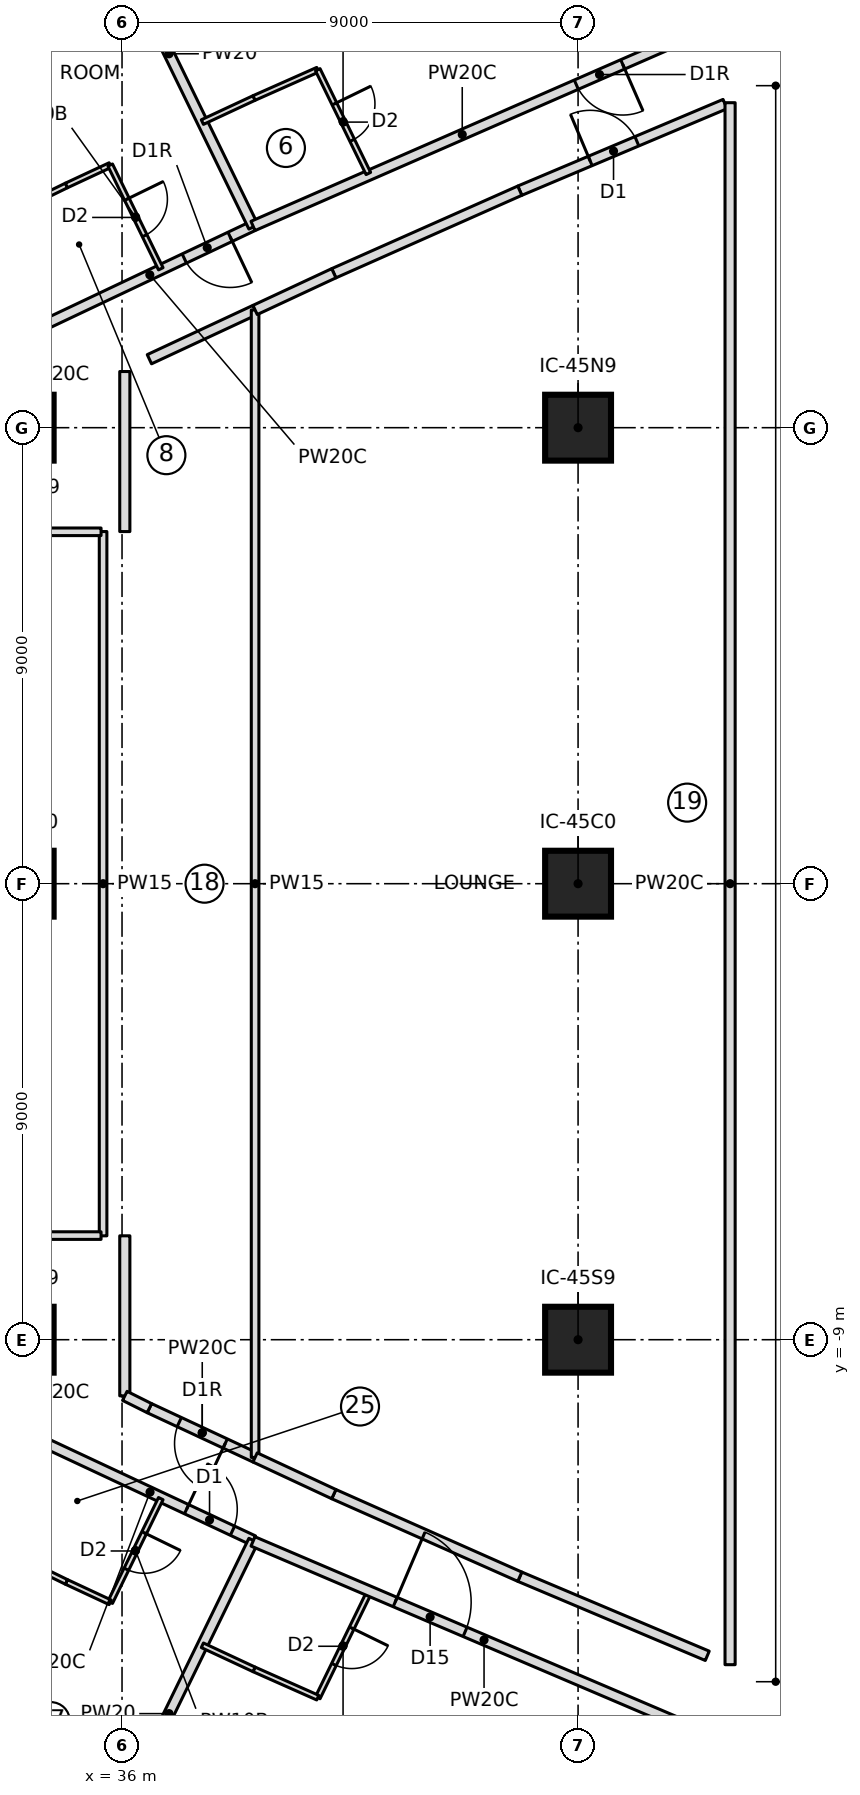
"""IFC4 building model, lengths in metres.
Left out: names, types, materials, properties, quantities, classifications, styles, units other than length and angle.
Written with IfcOpenShell. Run it as: python <this file> out.ifc"""

import sys

from ifc_helpers import new_model, si_unit, direction, frame, frame_2d, origin, origin_2d, place, context, subcontext, project, spatial, rectangle, extrude, element, fill, save


model = new_model("IFC4")
c1 = context("Model", 3, precision=1e-05, world=origin(), true_north=direction((0.0, 1.0)))
c2 = subcontext(c1, "Body", "Model", "MODEL_VIEW")
j1 = project(units=[si_unit("LENGTHUNIT", "METRE"), si_unit("PLANEANGLEUNIT", "RADIAN")], contexts=[c1])
p1 = place(None, origin())
s1 = spatial("IfcSite", under=j1, at=p1, CompositionType="ELEMENT")
p2 = place(p1, origin())
s2 = spatial("IfcBuilding", under=s1, at=p2, CompositionType="ELEMENT")
p3 = place(p2, frame((0.0, 0.0, 39.6)))
s3 = spatial("IfcBuildingStorey", under=s2, at=p3, CompositionType="ELEMENT", Elevation=39.6)
for number, where, z_axis, x_axis in (
    (1, (34.0, -9.0, 0.0), (0.0, 0.0, 1.0), (1.0, 0.0, 0.0)),
    (2, (34.0, 0.0, 0.0), (0.0, 0.0, 1.0), (1.0, 0.0, 0.0)),
    (3, (34.0, 9.0, 0.0), (0.0, 0.0, 1.0), (1.0, 0.0, 0.0)),
    (4, (45.0, -9.0, 0.0), (0.0, 0.0, 1.0), (1.0, 0.0, 0.0)),
    (5, (45.0, 0.0, 0.0), (0.0, 0.0, 1.0), (1.0, 0.0, 0.0)),
    (6, (45.0, 9.0, 0.0), (0.0, 0.0, 1.0), (1.0, 0.0, 0.0)),
):
    element("IfcColumn", number, at=place(p3, frame(where, z_axis=z_axis, x_axis=x_axis)), inside=s3, PredefinedType="COLUMN", context=c2, shape_type="SweptSolid", body=[
        extrude(rectangle(XDim=1.3, YDim=1.3, at=origin_2d()), origin(), (0.0, 0.0, 1.0), 3.55),
    ])
p4 = place(p3, frame((38.585, 12.981, 0.0), z_axis=(0.0, 0.0, 1.0), x_axis=(-0.903706948966, -0.428151550727, 0.0)))
e7 = element("IfcWall", 7, at=p4, inside=s3, PredefinedType="PARTITIONING", context=c2, shape_type="SweptSolid", body=[
    extrude(rectangle(XDim=4.506, YDim=0.2, at=frame_2d((2.253, 0.0))), origin(), (0.0, 0.0, 1.0), 3.25),
])
p5 = place(p4, frame((0.5, 0.0, 0.0)))
e8 = element("IfcOpeningElement", 8, at=p5, cuts=e7, PredefinedType="OPENING", context=c2, shape_type="SweptSolid", body=[
    extrude(rectangle(XDim=1.0, YDim=2.1, at=frame_2d((0.5, 1.05))), frame((0.0, 0.11, 0.0), z_axis=(0.0, -1.0, 0.0), x_axis=(1.0, 0.0, 0.0)), (0.0, 0.0, 1.0), 0.22),
])
p6 = place(p3, frame((33.513, 13.101, 0.0), z_axis=(0.0, 0.0, 1.0), x_axis=(0.898338680123, 0.439303557685, 0.0)))
e9 = element("IfcWall", 9, at=p6, inside=s3, PredefinedType="PARTITIONING", context=c2, shape_type="SweptSolid", body=[
    extrude(rectangle(XDim=1.547, YDim=0.1, at=frame_2d((0.773, 0.0))), origin(), (0.0, 0.0, 1.0), 3.25),
])
p7 = place(p3, frame((34.903, 13.781, 0.0), z_axis=(0.0, 0.0, 1.0), x_axis=(0.906477304063, 0.422254540791, 0.0)))
e10 = element("IfcWall", 10, at=p7, inside=s3, PredefinedType="PARTITIONING", context=c2, shape_type="SweptSolid", body=[
    extrude(rectangle(XDim=0.953, YDim=0.1, at=frame_2d((0.477, 0.0))), origin(), (0.0, 0.0, 1.0), 3.25),
])
p8 = place(p3, frame((35.767, 14.183, 0.0), z_axis=(0.0, 0.0, 1.0), x_axis=(0.438229314017, -0.898863208912, 0.0)))
e11 = element("IfcWall", 11, at=p8, inside=s3, PredefinedType="PARTITIONING", context=c2, shape_type="SweptSolid", body=[
    extrude(rectangle(XDim=2.277, YDim=0.1, at=frame_2d((1.139, 0.0))), origin(), (0.0, 0.0, 1.0), 3.25),
])
p9 = place(p8, frame((0.75, 0.0, 0.0)))
e12 = element("IfcOpeningElement", 12, at=p9, cuts=e11, PredefinedType="OPENING", context=c2, shape_type="SweptSolid", body=[
    extrude(rectangle(XDim=0.8, YDim=2.1, at=frame_2d((0.4, 1.05))), frame((0.0, 0.06, 0.0), z_axis=(0.0, -1.0, 0.0), x_axis=(1.0, 0.0, 0.0)), (0.0, 0.0, 1.0), 0.12),
])
p10 = place(p3, frame((38.594, 12.963, 0.0), z_axis=(0.0, 0.0, 1.0), x_axis=(-0.438197705697, 0.898878618459, 0.0)))
e13 = element("IfcWall", 13, at=p10, inside=s3, PredefinedType="PARTITIONING", context=c2, shape_type="SweptSolid", body=[
    extrude(rectangle(XDim=7.601, YDim=0.2, at=frame_2d((3.801, 0.0))), origin(), (0.0, 0.0, 1.0), 3.25),
])
p11 = place(p3, frame((46.844, 16.591, 0.0), z_axis=(0.0, 0.0, 1.0), x_axis=(-0.916303988169, -0.400483459415, 0.0)))
e14 = element("IfcWall", 14, at=p11, inside=s3, PredefinedType="PARTITIONING", context=c2, shape_type="SweptSolid", body=[
    extrude(rectangle(XDim=9.013, YDim=0.2, at=frame_2d((4.507, 0.0))), origin(), (0.0, 0.0, 1.0), 3.25),
])
p12 = place(p11, frame((1.05, 0.0, 0.0)))
e15 = element("IfcOpeningElement", 15, at=p12, cuts=e14, PredefinedType="OPENING", context=c2, shape_type="SweptSolid", body=[
    extrude(rectangle(XDim=1.0, YDim=2.1, at=frame_2d((0.5, 1.05))), frame((0.0, 0.11, 0.0), z_axis=(0.0, -1.0, 0.0), x_axis=(1.0, 0.0, 0.0)), (0.0, 0.0, 1.0), 0.22),
])
p13 = place(p3, frame((37.586, 15.031, 0.0), z_axis=(0.0, 0.0, 1.0), x_axis=(0.90632717857, 0.422576673972, 0.0)))
e16 = element("IfcWall", 16, at=p13, inside=s3, PredefinedType="PARTITIONING", context=c2, shape_type="SweptSolid", body=[
    extrude(rectangle(XDim=1.125, YDim=0.1, at=frame_2d((0.563, 0.0))), origin(), (0.0, 0.0, 1.0), 3.25),
])
p14 = place(p3, frame((38.606, 15.507, 0.0), z_axis=(0.0, 0.0, 1.0), x_axis=(0.913972512123, 0.405776104625, 0.0)))
e17 = element("IfcWall", 17, at=p14, inside=s3, PredefinedType="PARTITIONING", context=c2, shape_type="SweptSolid", body=[
    extrude(rectangle(XDim=1.375, YDim=0.1, at=frame_2d((0.688, 0.0))), origin(), (0.0, 0.0, 1.0), 3.25),
])
p15 = place(p3, frame((39.863, 16.065, 0.0), z_axis=(0.0, 0.0, 1.0), x_axis=(0.438233629628, -0.898861104878, 0.0)))
e18 = element("IfcWall", 18, at=p15, inside=s3, PredefinedType="PARTITIONING", context=c2, shape_type="SweptSolid", body=[
    extrude(rectangle(XDim=2.279, YDim=0.1, at=frame_2d((1.139, 0.0))), origin(), (0.0, 0.0, 1.0), 3.25),
])
p16 = place(p15, frame((0.75, 0.0, 0.0)))
e19 = element("IfcOpeningElement", 19, at=p16, cuts=e18, PredefinedType="OPENING", context=c2, shape_type="SweptSolid", body=[
    extrude(rectangle(XDim=0.8, YDim=2.1, at=frame_2d((0.4, 1.05))), frame((0.0, 0.06, 0.0), z_axis=(0.0, -1.0, 0.0), x_axis=(1.0, 0.0, 0.0)), (0.0, 0.0, 1.0), 0.12),
])
p17 = place(p3, frame((34.512, -11.052, 0.0), z_axis=(0.0, 0.0, 1.0), x_axis=(0.905585758423, -0.424163216394, 0.0)))
e20 = element("IfcWall", 20, at=p17, inside=s3, PredefinedType="PARTITIONING", context=c2, shape_type="SweptSolid", body=[
    extrude(rectangle(XDim=4.507, YDim=0.2, at=frame_2d((2.253, 0.0))), origin(), (0.0, 0.0, 1.0), 3.25),
])
p18 = place(p17, frame((3.05, 0.0, 0.0)))
e21 = element("IfcOpeningElement", 21, at=p18, cuts=e20, PredefinedType="OPENING", context=c2, shape_type="SweptSolid", body=[
    extrude(rectangle(XDim=1.0, YDim=2.1, at=frame_2d((0.5, 1.05))), frame((0.0, 0.11, 0.0), z_axis=(0.0, -1.0, 0.0), x_axis=(1.0, 0.0, 0.0)), (0.0, 0.0, 1.0), 0.22),
])
p19 = place(p3, frame((36.765, -12.136, 0.0), z_axis=(0.0, 0.0, 1.0), x_axis=(-0.438229314017, -0.898863208912, 0.0)))
e22 = element("IfcWall", 22, at=p19, inside=s3, PredefinedType="PARTITIONING", context=c2, shape_type="SweptSolid", body=[
    extrude(rectangle(XDim=2.277, YDim=0.1, at=frame_2d((1.139, 0.0))), origin(), (0.0, 0.0, 1.0), 3.25),
])
p20 = place(p19, frame((0.75, 0.0, 0.0)))
e23 = element("IfcOpeningElement", 23, at=p20, cuts=e22, PredefinedType="OPENING", context=c2, shape_type="SweptSolid", body=[
    extrude(rectangle(XDim=0.8, YDim=2.1, at=frame_2d((0.4, 1.05))), frame((0.0, 0.06, 0.0), z_axis=(0.0, -1.0, 0.0), x_axis=(1.0, 0.0, 0.0)), (0.0, 0.0, 1.0), 0.12),
])
p21 = place(p3, frame((35.767, -14.183, 0.0), z_axis=(0.0, 0.0, 1.0), x_axis=(-0.906477304063, 0.422254540791, 0.0)))
e24 = element("IfcWall", 24, at=p21, inside=s3, PredefinedType="PARTITIONING", context=c2, shape_type="SweptSolid", body=[
    extrude(rectangle(XDim=0.953, YDim=0.1, at=frame_2d((0.477, 0.0))), origin(), (0.0, 0.0, 1.0), 3.25),
])
p22 = place(p3, frame((34.903, -13.781, 0.0), z_axis=(0.0, 0.0, 1.0), x_axis=(-0.898338680123, 0.439303557685, 0.0)))
e25 = element("IfcWall", 25, at=p22, inside=s3, PredefinedType="PARTITIONING", context=c2, shape_type="SweptSolid", body=[
    extrude(rectangle(XDim=1.547, YDim=0.1, at=frame_2d((0.773, 0.0))), origin(), (0.0, 0.0, 1.0), 3.25),
])
p23 = place(p3, frame((35.263, -19.796, 0.0), z_axis=(0.0, 0.0, 1.0), x_axis=(0.438197705697, 0.898878618459, 0.0)))
e26 = element("IfcWall", 26, at=p23, inside=s3, PredefinedType="PARTITIONING", context=c2, shape_type="SweptSolid", body=[
    extrude(rectangle(XDim=7.601, YDim=0.2, at=frame_2d((3.801, 0.0))), origin(), (0.0, 0.0, 1.0), 3.25),
])
p24 = place(p3, frame((40.861, -14.017, 0.0), z_axis=(0.0, 0.0, 1.0), x_axis=(-0.438233629628, -0.898861104878, 0.0)))
e27 = element("IfcWall", 27, at=p24, inside=s3, PredefinedType="PARTITIONING", context=c2, shape_type="SweptSolid", body=[
    extrude(rectangle(XDim=2.279, YDim=0.1, at=frame_2d((1.139, 0.0))), origin(), (0.0, 0.0, 1.0), 3.25),
])
p25 = place(p24, frame((0.75, 0.0, 0.0)))
e28 = element("IfcOpeningElement", 28, at=p25, cuts=e27, PredefinedType="OPENING", context=c2, shape_type="SweptSolid", body=[
    extrude(rectangle(XDim=0.8, YDim=2.1, at=frame_2d((0.4, 1.05))), frame((0.0, 0.06, 0.0), z_axis=(0.0, -1.0, 0.0), x_axis=(1.0, 0.0, 0.0)), (0.0, 0.0, 1.0), 0.12),
])
p26 = place(p3, frame((39.863, -16.065, 0.0), z_axis=(0.0, 0.0, 1.0), x_axis=(-0.913972512123, 0.405776104625, 0.0)))
e29 = element("IfcWall", 29, at=p26, inside=s3, PredefinedType="PARTITIONING", context=c2, shape_type="SweptSolid", body=[
    extrude(rectangle(XDim=1.375, YDim=0.1, at=frame_2d((0.688, 0.0))), origin(), (0.0, 0.0, 1.0), 3.25),
])
p27 = place(p3, frame((38.606, -15.507, 0.0), z_axis=(0.0, 0.0, 1.0), x_axis=(-0.90632717857, 0.422576673972, 0.0)))
e30 = element("IfcWall", 30, at=p27, inside=s3, PredefinedType="PARTITIONING", context=c2, shape_type="SweptSolid", body=[
    extrude(rectangle(XDim=1.125, YDim=0.1, at=frame_2d((0.563, 0.0))), origin(), (0.0, 0.0, 1.0), 3.25),
])
p28 = place(p3, frame((35.626, -6.95, 0.0), z_axis=(0.0, 0.0, 1.0), x_axis=(0.0, 1.0, 0.0)))
e31 = element("IfcWall", 31, at=p28, inside=s3, PredefinedType="PARTITIONING", context=c2, shape_type="SweptSolid", body=[
    extrude(rectangle(XDim=13.9, YDim=0.15, at=frame_2d((6.95, 0.0))), origin(), (0.0, 0.0, 1.0), 3.25),
])
p29 = place(p3, frame((38.626, -11.323, 0.0), z_axis=(0.0, 0.0, 1.0), x_axis=(-0.906372737018, 0.422478948103, 0.0)))
e32 = element("IfcWall", 32, at=p29, inside=s3, PredefinedType="PARTITIONING", context=c2, shape_type="SweptSolid", body=[
    extrude(rectangle(XDim=2.302, YDim=0.2, at=frame_2d((1.151, 0.0))), origin(), (0.0, 0.0, 1.0), 3.25),
])
p30 = place(p29, frame((0.651, 0.0, 0.0)))
e33 = element("IfcOpeningElement", 33, at=p30, cuts=e32, PredefinedType="OPENING", context=c2, shape_type="SweptSolid", body=[
    extrude(rectangle(XDim=1.0, YDim=2.1, at=frame_2d((0.5, 1.05))), frame((0.0, 0.11, 0.0), z_axis=(0.0, -1.0, 0.0), x_axis=(1.0, 0.0, 0.0)), (0.0, 0.0, 1.0), 0.22),
])
p31 = place(p3, frame((36.54, 10.351, 0.0), z_axis=(0.0, 0.0, 1.0), x_axis=(0.906372737018, 0.422478948103, 0.0)))
e34 = element("IfcWall", 34, at=p31, inside=s3, PredefinedType="PARTITIONING", context=c2, shape_type="SweptSolid", body=[
    extrude(rectangle(XDim=2.302, YDim=0.2, at=frame_2d((1.151, 0.0))), origin(), (0.0, 0.0, 1.0), 3.25),
])
p32 = place(p3, frame((38.626, -11.323, 0.0), z_axis=(0.0, 0.0, 1.0), x_axis=(0.0, 1.0, 0.0)))
e35 = element("IfcWall", 35, at=p32, inside=s3, PredefinedType="PARTITIONING", context=c2, shape_type="SweptSolid", body=[
    extrude(rectangle(XDim=22.647, YDim=0.15, at=frame_2d((11.323, 0.0))), origin(), (0.0, 0.0, 1.0), 3.25),
])
p33 = place(p3, frame((43.85, 13.677, 0.0), z_axis=(0.0, 0.0, 1.0), x_axis=(0.921265924084, 0.388933281068, 0.0)))
e36 = element("IfcWall", 36, at=p33, inside=s3, PredefinedType="PARTITIONING", context=c2, shape_type="SweptSolid", body=[
    extrude(rectangle(XDim=4.396, YDim=0.2, at=frame_2d((2.198, 0.0))), origin(), (0.0, 0.0, 1.0), 3.25),
])
p34 = place(p33, frame((1.508, 0.0, 0.0)))
e37 = element("IfcOpeningElement", 37, at=p34, cuts=e36, PredefinedType="OPENING", context=c2, shape_type="SweptSolid", body=[
    extrude(rectangle(XDim=1.0, YDim=2.1, at=frame_2d((0.5, 1.05))), frame((0.0, 0.11, 0.0), z_axis=(0.0, -1.0, 0.0), x_axis=(1.0, 0.0, 0.0)), (0.0, 0.0, 1.0), 0.22),
])
p35 = place(p3, frame((40.18, 12.048, 0.0), z_axis=(0.0, 0.0, 1.0), x_axis=(0.913986953061, 0.405743576209, 0.0)))
e38 = element("IfcWall", 38, at=p35, inside=s3, PredefinedType="PARTITIONING", context=c2, shape_type="SweptSolid", body=[
    extrude(rectangle(XDim=4.016, YDim=0.2, at=frame_2d((2.008, 0.0))), origin(), (0.0, 0.0, 1.0), 3.25),
])
p36 = place(p3, frame((47.55, -15.239, 0.0), z_axis=(0.0, 0.0, 1.0), x_axis=(-0.921269894054, 0.388923877269, 0.0)))
e39 = element("IfcWall", 39, at=p36, inside=s3, PredefinedType="PARTITIONING", context=c2, shape_type="SweptSolid", body=[
    extrude(rectangle(XDim=4.016, YDim=0.2, at=frame_2d((2.008, 0.0))), origin(), (0.0, 0.0, 1.0), 3.25),
])
p37 = place(p3, frame((43.85, -13.677, 0.0), z_axis=(0.0, 0.0, 1.0), x_axis=(-0.913986953061, 0.405743576209, 0.0)))
e40 = element("IfcWall", 40, at=p37, inside=s3, PredefinedType="PARTITIONING", context=c2, shape_type="SweptSolid", body=[
    extrude(rectangle(XDim=4.016, YDim=0.2, at=frame_2d((2.008, 0.0))), origin(), (0.0, 0.0, 1.0), 3.25),
])
for number, where, z_axis, x_axis in (
    (41, (40.18, -12.048, 0.0), (0.0, 0.0, 1.0), (-0.906, 0.423, 0.0)),
    (42, (38.626, 11.323, 0.0), (0.0, 0.0, 1.0), (0.906, 0.423, 0.0)),
):
    element("IfcWall", number, at=place(p3, frame(where, z_axis=z_axis, x_axis=x_axis)), inside=s3, PredefinedType="PARTITIONING", context=c2, shape_type="SweptSolid", body=[
        extrude(rectangle(XDim=1.714, YDim=0.2, at=frame_2d((0.857, 0.0))), origin(), (0.0, 0.0, 1.0), 3.25),
    ])
p38 = place(p3, frame((38.585, -12.981, 0.0), z_axis=(0.0, 0.0, 1.0), x_axis=(0.919847962482, -0.392275064103, 0.0)))
e43 = element("IfcWall", 43, at=p38, inside=s3, PredefinedType="PARTITIONING", context=c2, shape_type="SweptSolid", body=[
    extrude(rectangle(XDim=9.914, YDim=0.2, at=frame_2d((4.957, 0.0))), origin(), (0.0, 0.0, 1.0), 3.25),
])
p39 = place(p38, frame((3.05, 0.0, 0.0)))
e44 = element("IfcOpeningElement", 44, at=p39, cuts=e43, PredefinedType="OPENING", context=c2, shape_type="SweptSolid", body=[
    extrude(rectangle(XDim=1.5, YDim=2.1, at=frame_2d((0.75, 1.05))), frame((0.0, 0.11, 0.0), z_axis=(0.0, -1.0, 0.0), x_axis=(1.0, 0.0, 0.0)), (0.0, 0.0, 1.0), 0.22),
])
p40 = place(p3, frame((35.586, -6.945, 0.0), z_axis=(0.0, 0.0, 1.0), x_axis=(-0.999999997748, -6.7114094e-05, 0.0)))
e45 = element("IfcWall", 45, at=p40, inside=s3, PredefinedType="PARTITIONING", context=c2, shape_type="SweptSolid", body=[
    extrude(rectangle(XDim=3.638, YDim=0.15, at=frame_2d((1.819, 0.0))), origin(), (0.0, 0.0, 1.0), 3.25),
])
p41 = place(p3, frame((31.989, 6.945, 0.0), z_axis=(0.0, 0.0, 1.0), x_axis=(0.999999997697, -6.786102e-05, 0.0)))
e46 = element("IfcWall", 46, at=p41, inside=s3, PredefinedType="PARTITIONING", context=c2, shape_type="SweptSolid", body=[
    extrude(rectangle(XDim=3.598, YDim=0.15, at=frame_2d((1.799, 0.0))), origin(), (0.0, 0.0, 1.0), 3.25),
])
for number, where, z_axis, x_axis in (
    (47, (36.055, -10.108, 0.0), (0.0, 0.0, 1.0), (0.0, 1.0, 0.0)),
    (48, (36.055, 6.949, 0.0), (0.0, 0.0, 1.0), (0.0, 1.0, 0.0)),
):
    element("IfcWall", number, at=place(p3, frame(where, z_axis=z_axis, x_axis=x_axis)), inside=s3, PredefinedType="PARTITIONING", context=c2, shape_type="SweptSolid", body=[
        extrude(rectangle(XDim=3.159, YDim=0.2, at=frame_2d((1.58, 0.0))), origin(), (0.0, 0.0, 1.0), 3.25),
    ])
p42 = place(p3, frame((48.0, 15.414, 0.0), z_axis=(0.0, 0.0, 1.0), x_axis=(0.0, -1.0, 0.0)))
e49 = element("IfcWall", 49, at=p42, inside=s3, PredefinedType="PARTITIONING", context=c2, shape_type="SweptSolid", body=[
    extrude(rectangle(XDim=30.828, YDim=0.2, at=frame_2d((15.414, 0.0))), origin(), (0.0, 0.0, 1.0), 3.25),
])
p43 = place(p3, frame((36.54, -10.351, 0.0), z_axis=(0.0, 0.0, 1.0), x_axis=(-0.894337154042, 0.447393624116, 0.0)))
e50 = element("IfcWall", 50, at=p43, inside=s3, PredefinedType="PARTITIONING", context=c2, shape_type="SweptSolid", body=[
    extrude(rectangle(XDim=0.542, YDim=0.2, at=frame_2d((0.271, 0.0))), origin(), (0.0, 0.0, 1.0), 3.25),
])
p44 = place(p9, origin())
e51 = element("IfcDoor", 51, at=p44, inside=s3, OperationType="SINGLE_SWING_LEFT", PredefinedType="DOOR", context=c2, shape_type="SweptSolid", body=[
    extrude(rectangle(XDim=0.8, YDim=2.1, at=frame_2d((0.4, 1.05))), frame((0.0, 0.025, 0.0), z_axis=(0.0, -1.0, 0.0), x_axis=(1.0, 0.0, 0.0)), (0.0, 0.0, 1.0), 0.05),
])
fill(e12, e51)
p45 = place(p5, origin())
e52 = element("IfcDoor", 52, at=p45, inside=s3, OperationType="SINGLE_SWING_RIGHT", PredefinedType="DOOR", context=c2, shape_type="SweptSolid", body=[
    extrude(rectangle(XDim=1.0, YDim=2.1, at=frame_2d((0.5, 1.05))), frame((0.0, 0.025, 0.0), z_axis=(0.0, -1.0, 0.0), x_axis=(1.0, 0.0, 0.0)), (0.0, 0.0, 1.0), 0.05),
])
fill(e8, e52)
p46 = place(p16, origin())
e53 = element("IfcDoor", 53, at=p46, inside=s3, OperationType="SINGLE_SWING_LEFT", PredefinedType="DOOR", context=c2, shape_type="SweptSolid", body=[
    extrude(rectangle(XDim=0.8, YDim=2.1, at=frame_2d((0.4, 1.05))), frame((0.0, 0.025, 0.0), z_axis=(0.0, -1.0, 0.0), x_axis=(1.0, 0.0, 0.0)), (0.0, 0.0, 1.0), 0.05),
])
fill(e19, e53)
p47 = place(p12, origin())
e54 = element("IfcDoor", 54, at=p47, inside=s3, OperationType="SINGLE_SWING_RIGHT", PredefinedType="DOOR", context=c2, shape_type="SweptSolid", body=[
    extrude(rectangle(XDim=1.0, YDim=2.1, at=frame_2d((0.5, 1.05))), frame((0.0, 0.025, 0.0), z_axis=(0.0, -1.0, 0.0), x_axis=(1.0, 0.0, 0.0)), (0.0, 0.0, 1.0), 0.05),
])
fill(e15, e54)
p48 = place(p20, origin())
e55 = element("IfcDoor", 55, at=p48, inside=s3, OperationType="SINGLE_SWING_LEFT", PredefinedType="DOOR", context=c2, shape_type="SweptSolid", body=[
    extrude(rectangle(XDim=0.8, YDim=2.1, at=frame_2d((0.4, 1.05))), frame((0.0, 0.025, 0.0), z_axis=(0.0, -1.0, 0.0), x_axis=(1.0, 0.0, 0.0)), (0.0, 0.0, 1.0), 0.05),
])
fill(e23, e55)
p49 = place(p18, origin())
e56 = element("IfcDoor", 56, at=p49, inside=s3, OperationType="SINGLE_SWING_LEFT", PredefinedType="DOOR", context=c2, shape_type="SweptSolid", body=[
    extrude(rectangle(XDim=1.0, YDim=2.1, at=frame_2d((0.5, 1.05))), frame((0.0, 0.025, 0.0), z_axis=(0.0, -1.0, 0.0), x_axis=(1.0, 0.0, 0.0)), (0.0, 0.0, 1.0), 0.05),
])
fill(e21, e56)
p50 = place(p25, origin())
e57 = element("IfcDoor", 57, at=p50, inside=s3, OperationType="SINGLE_SWING_LEFT", PredefinedType="DOOR", context=c2, shape_type="SweptSolid", body=[
    extrude(rectangle(XDim=0.8, YDim=2.1, at=frame_2d((0.4, 1.05))), frame((0.0, 0.025, 0.0), z_axis=(0.0, -1.0, 0.0), x_axis=(1.0, 0.0, 0.0)), (0.0, 0.0, 1.0), 0.05),
])
fill(e28, e57)
p51 = place(p39, origin())
e58 = element("IfcDoor", 58, at=p51, inside=s3, OperationType="DOUBLE_DOOR_SINGLE_SWING", PredefinedType="DOOR", context=c2, shape_type="SweptSolid", body=[
    extrude(rectangle(XDim=1.5, YDim=2.1, at=frame_2d((0.75, 1.05))), frame((0.0, 0.025, 0.0), z_axis=(0.0, -1.0, 0.0), x_axis=(1.0, 0.0, 0.0)), (0.0, 0.0, 1.0), 0.05),
])
fill(e44, e58)
p52 = place(p30, origin())
e59 = element("IfcDoor", 59, at=p52, inside=s3, OperationType="SINGLE_SWING_RIGHT", PredefinedType="DOOR", context=c2, shape_type="SweptSolid", body=[
    extrude(rectangle(XDim=1.0, YDim=2.1, at=frame_2d((0.5, 1.05))), frame((0.0, 0.025, 0.0), z_axis=(0.0, -1.0, 0.0), x_axis=(1.0, 0.0, 0.0)), (0.0, 0.0, 1.0), 0.05),
])
fill(e33, e59)
p53 = place(p34, origin())
e60 = element("IfcDoor", 60, at=p53, inside=s3, OperationType="SINGLE_SWING_LEFT", PredefinedType="DOOR", context=c2, shape_type="SweptSolid", body=[
    extrude(rectangle(XDim=1.0, YDim=2.1, at=frame_2d((0.5, 1.05))), frame((0.0, 0.025, 0.0), z_axis=(0.0, -1.0, 0.0), x_axis=(1.0, 0.0, 0.0)), (0.0, 0.0, 1.0), 0.05),
])
fill(e37, e60)
save(model, sys.argv[1])
